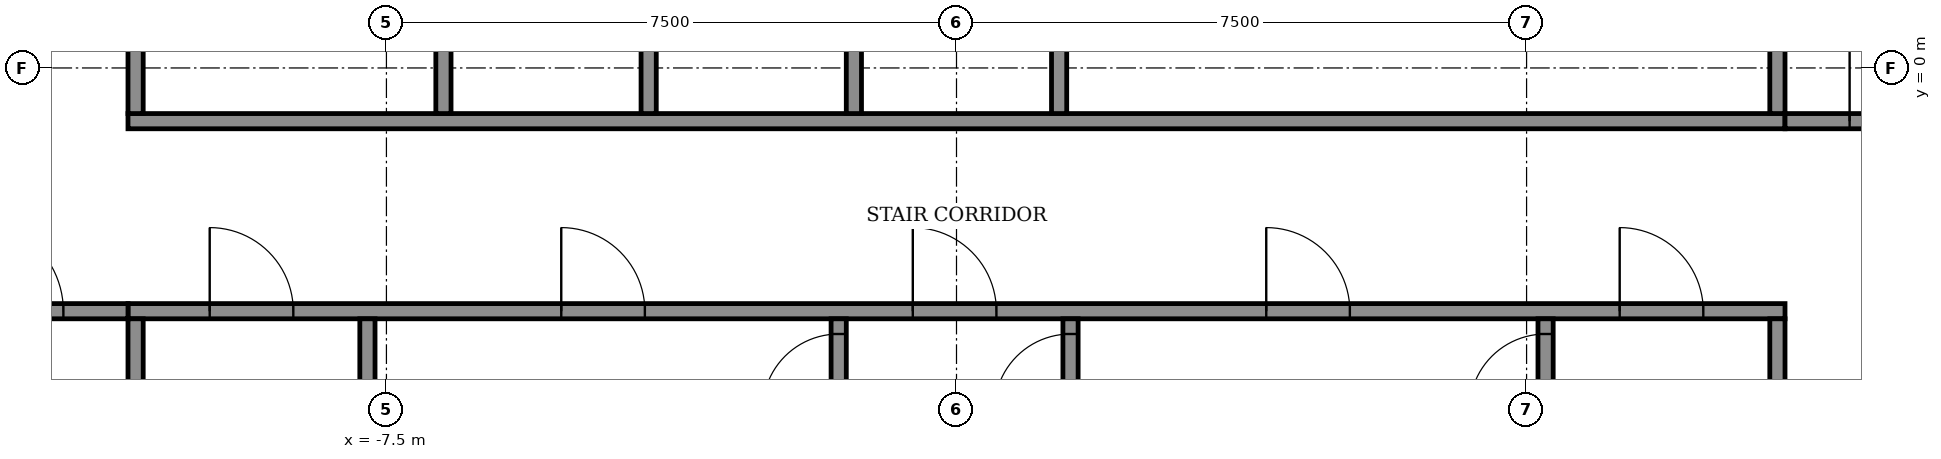
"""IFC4 building model, lengths in metres.
Left out: names, types, materials, properties, quantities, classifications, styles, units other than length and angle.
Written with IfcOpenShell. Run it as: python <this file> out.ifc"""

import sys

from ifc_helpers import new_model, si_unit, direction, frame, frame_2d, origin, place, context, subcontext, project, spatial, rectangle, extrude, element, fill, save


model = new_model("IFC4")
c1 = context("Model", 3, precision=1e-05, world=origin(), true_north=direction((0.0, 1.0)))
c2 = subcontext(c1, "Body", "Model", "MODEL_VIEW")
j1 = project(units=[si_unit("LENGTHUNIT", "METRE"), si_unit("PLANEANGLEUNIT", "RADIAN")], contexts=[c1])
p1 = place(None, origin())
s1 = spatial("IfcSite", under=j1, at=p1, CompositionType="ELEMENT")
p2 = place(p1, origin())
s2 = spatial("IfcBuilding", under=s1, at=p2, CompositionType="ELEMENT")
p3 = place(p2, frame((0.0, 0.0, 337.9)))
s3 = spatial("IfcBuildingStorey", under=s2, at=p3, CompositionType="ELEMENT", Elevation=337.9)
p4 = place(p3, frame((-10.9, -3.2, 0.0), z_axis=(0.0, 0.0, 1.0), x_axis=(1.0, 0.0, 0.0)))
e1 = element("IfcWall", 1, at=p4, inside=s3, PredefinedType="SHEAR", context=c2, shape_type="SweptSolid", body=[
    extrude(rectangle(XDim=21.8, YDim=0.2, at=frame_2d((10.9, 0.0))), origin(), (0.0, 0.0, 1.0), 4.05),
])
p5 = place(p4, frame((1.075, 0.0, 0.0)))
e2 = element("IfcOpeningElement", 2, at=p5, cuts=e1, PredefinedType="OPENING", context=c2, shape_type="SweptSolid", body=[
    extrude(rectangle(XDim=1.1, YDim=2.1, at=frame_2d((0.55, 1.05))), frame((0.0, 0.11, 0.0), z_axis=(0.0, -1.0, 0.0), x_axis=(1.0, 0.0, 0.0)), (0.0, 0.0, 1.0), 0.22),
])
p6 = place(p4, frame((10.325, 0.0, 0.0)))
e3 = element("IfcOpeningElement", 3, at=p6, cuts=e1, PredefinedType="OPENING", context=c2, shape_type="SweptSolid", body=[
    extrude(rectangle(XDim=1.1, YDim=2.1, at=frame_2d((0.55, 1.05))), frame((0.0, 0.11, 0.0), z_axis=(0.0, -1.0, 0.0), x_axis=(1.0, 0.0, 0.0)), (0.0, 0.0, 1.0), 0.22),
])
p7 = place(p4, frame((19.625, 0.0, 0.0)))
e4 = element("IfcOpeningElement", 4, at=p7, cuts=e1, PredefinedType="OPENING", context=c2, shape_type="SweptSolid", body=[
    extrude(rectangle(XDim=1.1, YDim=2.1, at=frame_2d((0.55, 1.05))), frame((0.0, 0.11, 0.0), z_axis=(0.0, -1.0, 0.0), x_axis=(1.0, 0.0, 0.0)), (0.0, 0.0, 1.0), 0.22),
])
p8 = place(p4, frame((5.7, 0.0, 0.0)))
e5 = element("IfcOpeningElement", 5, at=p8, cuts=e1, PredefinedType="OPENING", context=c2, shape_type="SweptSolid", body=[
    extrude(rectangle(XDim=1.1, YDim=2.1, at=frame_2d((0.55, 1.05))), frame((0.0, 0.11, 0.0), z_axis=(0.0, -1.0, 0.0), x_axis=(1.0, 0.0, 0.0)), (0.0, 0.0, 1.0), 0.22),
])
p9 = place(p4, frame((14.975, 0.0, 0.0)))
e6 = element("IfcOpeningElement", 6, at=p9, cuts=e1, PredefinedType="OPENING", context=c2, shape_type="SweptSolid", body=[
    extrude(rectangle(XDim=1.1, YDim=2.1, at=frame_2d((0.55, 1.05))), frame((0.0, 0.11, 0.0), z_axis=(0.0, -1.0, 0.0), x_axis=(1.0, 0.0, 0.0)), (0.0, 0.0, 1.0), 0.22),
])
p10 = place(p3, frame((-10.9, -0.7, 0.0), z_axis=(0.0, 0.0, 1.0), x_axis=(1.0, 0.0, 0.0)))
e7 = element("IfcWall", 7, at=p10, inside=s3, PredefinedType="SHEAR", context=c2, shape_type="SweptSolid", body=[
    extrude(rectangle(XDim=21.8, YDim=0.2, at=frame_2d((10.9, 0.0))), origin(), (0.0, 0.0, 1.0), 4.05),
])
for number, where, z_axis, x_axis in (
    (8, (-10.8, -10.8, 0.0), (0.0, 0.0, 1.0), (0.0, 1.0, 0.0)),
    (9, (-7.75, -10.8, 0.0), (0.0, 0.0, 1.0), (0.0, 1.0, 0.0)),
):
    element("IfcWall", number, at=place(p3, frame(where, z_axis=z_axis, x_axis=x_axis)), inside=s3, PredefinedType="SHEAR", context=c2, shape_type="SweptSolid", body=[
        extrude(rectangle(XDim=7.5, YDim=0.2, at=frame_2d((3.75, 0.0))), origin(), (0.0, 0.0, 1.0), 4.05),
    ])
p11 = place(p3, frame((-1.55, -10.8, 0.0), z_axis=(0.0, 0.0, 1.0), x_axis=(0.0, 1.0, 0.0)))
e10 = element("IfcWall", 10, at=p11, inside=s3, PredefinedType="SHEAR", context=c2, shape_type="SweptSolid", body=[
    extrude(rectangle(XDim=7.5, YDim=0.2, at=frame_2d((3.75, 0.0))), origin(), (0.0, 0.0, 1.0), 4.05),
])
p12 = place(p11, frame((6.3, 0.0, 0.0)))
e11 = element("IfcOpeningElement", 11, at=p12, cuts=e10, PredefinedType="OPENING", context=c2, shape_type="SweptSolid", body=[
    extrude(rectangle(XDim=1.0, YDim=2.1, at=frame_2d((0.5, 1.05))), frame((0.0, 0.11, 0.0), z_axis=(0.0, -1.0, 0.0), x_axis=(1.0, 0.0, 0.0)), (0.0, 0.0, 1.0), 0.22),
])
p13 = place(p3, frame((1.5, -10.8, 0.0), z_axis=(0.0, 0.0, 1.0), x_axis=(0.0, 1.0, 0.0)))
e12 = element("IfcWall", 12, at=p13, inside=s3, PredefinedType="SHEAR", context=c2, shape_type="SweptSolid", body=[
    extrude(rectangle(XDim=7.5, YDim=0.2, at=frame_2d((3.75, 0.0))), origin(), (0.0, 0.0, 1.0), 4.05),
])
p14 = place(p13, frame((6.3, 0.0, 0.0)))
e13 = element("IfcOpeningElement", 13, at=p14, cuts=e12, PredefinedType="OPENING", context=c2, shape_type="SweptSolid", body=[
    extrude(rectangle(XDim=1.0, YDim=2.1, at=frame_2d((0.5, 1.05))), frame((0.0, 0.11, 0.0), z_axis=(0.0, -1.0, 0.0), x_axis=(1.0, 0.0, 0.0)), (0.0, 0.0, 1.0), 0.22),
])
p15 = place(p3, frame((7.75, -10.8, 0.0), z_axis=(0.0, 0.0, 1.0), x_axis=(0.0, 1.0, 0.0)))
e14 = element("IfcWall", 14, at=p15, inside=s3, PredefinedType="SHEAR", context=c2, shape_type="SweptSolid", body=[
    extrude(rectangle(XDim=7.5, YDim=0.2, at=frame_2d((3.75, 0.0))), origin(), (0.0, 0.0, 1.0), 4.05),
])
p16 = place(p15, frame((6.3, 0.0, 0.0)))
e15 = element("IfcOpeningElement", 15, at=p16, cuts=e14, PredefinedType="OPENING", context=c2, shape_type="SweptSolid", body=[
    extrude(rectangle(XDim=1.0, YDim=2.1, at=frame_2d((0.5, 1.05))), frame((0.0, 0.11, 0.0), z_axis=(0.0, -1.0, 0.0), x_axis=(1.0, 0.0, 0.0)), (0.0, 0.0, 1.0), 0.22),
])
p17 = place(p3, frame((10.8, -10.8, 0.0), z_axis=(0.0, 0.0, 1.0), x_axis=(0.0, 1.0, 0.0)))
e16 = element("IfcWall", 16, at=p17, inside=s3, PredefinedType="SHEAR", context=c2, shape_type="SweptSolid", body=[
    extrude(rectangle(XDim=7.5, YDim=0.2, at=frame_2d((3.75, 0.0))), origin(), (0.0, 0.0, 1.0), 4.05),
])
p18 = place(p3, frame((-10.8, -0.6, 0.0), z_axis=(0.0, 0.0, 1.0), x_axis=(0.0, 1.0, 0.0)))
e17 = element("IfcWall", 17, at=p18, inside=s3, PredefinedType="STANDARD", context=c2, shape_type="SweptSolid", body=[
    extrude(rectangle(XDim=2.5, YDim=0.2, at=frame_2d((1.25, 0.0))), origin(), (0.0, 0.0, 1.0), 4.05),
])
for number, where, z_axis, x_axis in (
    (18, (-6.75, -0.6, 0.0), (0.0, 0.0, 1.0), (0.0, 1.0, 0.0)),
    (19, (-4.05, -0.6, 0.0), (0.0, 0.0, 1.0), (0.0, 1.0, 0.0)),
    (20, (-1.35, -0.6, 0.0), (0.0, 0.0, 1.0), (0.0, 1.0, 0.0)),
    (21, (1.35, -0.6, 0.0), (0.0, 0.0, 1.0), (0.0, 1.0, 0.0)),
):
    element("IfcWall", number, at=place(p3, frame(where, z_axis=z_axis, x_axis=x_axis)), inside=s3, PredefinedType="SHEAR", context=c2, shape_type="SweptSolid", body=[
        extrude(rectangle(XDim=2.5, YDim=0.2, at=frame_2d((1.25, 0.0))), origin(), (0.0, 0.0, 1.0), 4.05),
    ])
p19 = place(p3, frame((10.8, -0.6, 0.0), z_axis=(0.0, 0.0, 1.0), x_axis=(0.0, 1.0, 0.0)))
e22 = element("IfcWall", 22, at=p19, inside=s3, PredefinedType="STANDARD", context=c2, shape_type="SweptSolid", body=[
    extrude(rectangle(XDim=2.5, YDim=0.2, at=frame_2d((1.25, 0.0))), origin(), (0.0, 0.0, 1.0), 4.05),
])
p20 = place(p3, frame((-13.8, -3.2, 0.0), z_axis=(0.0, 0.0, 1.0), x_axis=(1.0, 0.0, 0.0)))
e23 = element("IfcWall", 23, at=p20, inside=s3, PredefinedType="STANDARD", context=c2, shape_type="SweptSolid", body=[
    extrude(rectangle(XDim=2.9, YDim=0.2, at=frame_2d((1.45, 0.0))), origin(), (0.0, 0.0, 1.0), 4.05),
])
p21 = place(p20, frame((0.85, 0.0, 0.0)))
e24 = element("IfcOpeningElement", 24, at=p21, cuts=e23, PredefinedType="OPENING", context=c2, shape_type="SweptSolid", body=[
    extrude(rectangle(XDim=1.2, YDim=2.1, at=frame_2d((0.6, 1.05))), frame((0.0, 0.11, 0.0), z_axis=(0.0, -1.0, 0.0), x_axis=(1.0, 0.0, 0.0)), (0.0, 0.0, 1.0), 0.22),
])
p22 = place(p3, frame((10.9, -0.7, 0.0), z_axis=(0.0, 0.0, 1.0), x_axis=(1.0, 0.0, 0.0)))
e25 = element("IfcWall", 25, at=p22, inside=s3, PredefinedType="STANDARD", context=c2, shape_type="SweptSolid", body=[
    extrude(rectangle(XDim=2.9, YDim=0.2, at=frame_2d((1.45, 0.0))), origin(), (0.0, 0.0, 1.0), 4.05),
])
p23 = place(p22, frame((0.85, 0.0, 0.0)))
e26 = element("IfcOpeningElement", 26, at=p23, cuts=e25, PredefinedType="OPENING", context=c2, shape_type="SweptSolid", body=[
    extrude(rectangle(XDim=1.2, YDim=2.1, at=frame_2d((0.6, 1.05))), frame((0.0, 0.11, 0.0), z_axis=(0.0, -1.0, 0.0), x_axis=(1.0, 0.0, 0.0)), (0.0, 0.0, 1.0), 0.22),
])
p24 = place(p5, origin())
e27 = element("IfcDoor", 27, at=p24, inside=s3, OperationType="SINGLE_SWING_RIGHT", PredefinedType="DOOR", context=c2, shape_type="SweptSolid", body=[
    extrude(rectangle(XDim=1.1, YDim=2.1, at=frame_2d((0.55, 1.05))), frame((0.0, 0.025, 0.0), z_axis=(0.0, -1.0, 0.0), x_axis=(1.0, 0.0, 0.0)), (0.0, 0.0, 1.0), 0.05),
])
fill(e2, e27)
p25 = place(p6, origin())
e28 = element("IfcDoor", 28, at=p25, inside=s3, OperationType="SINGLE_SWING_RIGHT", PredefinedType="DOOR", context=c2, shape_type="SweptSolid", body=[
    extrude(rectangle(XDim=1.1, YDim=2.1, at=frame_2d((0.55, 1.05))), frame((0.0, 0.025, 0.0), z_axis=(0.0, -1.0, 0.0), x_axis=(1.0, 0.0, 0.0)), (0.0, 0.0, 1.0), 0.05),
])
fill(e3, e28)
p26 = place(p7, origin())
e29 = element("IfcDoor", 29, at=p26, inside=s3, OperationType="SINGLE_SWING_RIGHT", PredefinedType="DOOR", context=c2, shape_type="SweptSolid", body=[
    extrude(rectangle(XDim=1.1, YDim=2.1, at=frame_2d((0.55, 1.05))), frame((0.0, 0.025, 0.0), z_axis=(0.0, -1.0, 0.0), x_axis=(1.0, 0.0, 0.0)), (0.0, 0.0, 1.0), 0.05),
])
fill(e4, e29)
p27 = place(p8, origin())
e30 = element("IfcDoor", 30, at=p27, inside=s3, OperationType="SINGLE_SWING_LEFT", PredefinedType="DOOR", context=c2, shape_type="SweptSolid", body=[
    extrude(rectangle(XDim=1.1, YDim=2.1, at=frame_2d((0.55, 1.05))), frame((0.0, 0.025, 0.0), z_axis=(0.0, -1.0, 0.0), x_axis=(1.0, 0.0, 0.0)), (0.0, 0.0, 1.0), 0.05),
])
fill(e5, e30)
p28 = place(p9, origin())
e31 = element("IfcDoor", 31, at=p28, inside=s3, OperationType="SINGLE_SWING_LEFT", PredefinedType="DOOR", context=c2, shape_type="SweptSolid", body=[
    extrude(rectangle(XDim=1.1, YDim=2.1, at=frame_2d((0.55, 1.05))), frame((0.0, 0.025, 0.0), z_axis=(0.0, -1.0, 0.0), x_axis=(1.0, 0.0, 0.0)), (0.0, 0.0, 1.0), 0.05),
])
fill(e6, e31)
p29 = place(p12, origin())
e32 = element("IfcDoor", 32, at=p29, inside=s3, OperationType="SINGLE_SWING_RIGHT", PredefinedType="DOOR", context=c2, shape_type="SweptSolid", body=[
    extrude(rectangle(XDim=1.0, YDim=2.1, at=frame_2d((0.5, 1.05))), frame((0.0, 0.025, 0.0), z_axis=(0.0, -1.0, 0.0), x_axis=(1.0, 0.0, 0.0)), (0.0, 0.0, 1.0), 0.05),
])
fill(e11, e32)
p30 = place(p14, origin())
e33 = element("IfcDoor", 33, at=p30, inside=s3, OperationType="SINGLE_SWING_RIGHT", PredefinedType="DOOR", context=c2, shape_type="SweptSolid", body=[
    extrude(rectangle(XDim=1.0, YDim=2.1, at=frame_2d((0.5, 1.05))), frame((0.0, 0.025, 0.0), z_axis=(0.0, -1.0, 0.0), x_axis=(1.0, 0.0, 0.0)), (0.0, 0.0, 1.0), 0.05),
])
fill(e13, e33)
p31 = place(p16, origin())
e34 = element("IfcDoor", 34, at=p31, inside=s3, OperationType="SINGLE_SWING_RIGHT", PredefinedType="DOOR", context=c2, shape_type="SweptSolid", body=[
    extrude(rectangle(XDim=1.0, YDim=2.1, at=frame_2d((0.5, 1.05))), frame((0.0, 0.025, 0.0), z_axis=(0.0, -1.0, 0.0), x_axis=(1.0, 0.0, 0.0)), (0.0, 0.0, 1.0), 0.05),
])
fill(e15, e34)
p32 = place(p21, origin())
e35 = element("IfcDoor", 35, at=p32, inside=s3, OperationType="SINGLE_SWING_LEFT", PredefinedType="DOOR", context=c2, shape_type="SweptSolid", body=[
    extrude(rectangle(XDim=1.2, YDim=2.1, at=frame_2d((0.6, 1.05))), frame((0.0, 0.025, 0.0), z_axis=(0.0, -1.0, 0.0), x_axis=(1.0, 0.0, 0.0)), (0.0, 0.0, 1.0), 0.05),
])
fill(e24, e35)
p33 = place(p23, origin())
e36 = element("IfcDoor", 36, at=p33, inside=s3, OperationType="SINGLE_SWING_LEFT", PredefinedType="DOOR", context=c2, shape_type="SweptSolid", body=[
    extrude(rectangle(XDim=1.2, YDim=2.1, at=frame_2d((0.6, 1.05))), frame((0.0, 0.025, 0.0), z_axis=(0.0, -1.0, 0.0), x_axis=(1.0, 0.0, 0.0)), (0.0, 0.0, 1.0), 0.05),
])
fill(e26, e36)
save(model, sys.argv[1])
